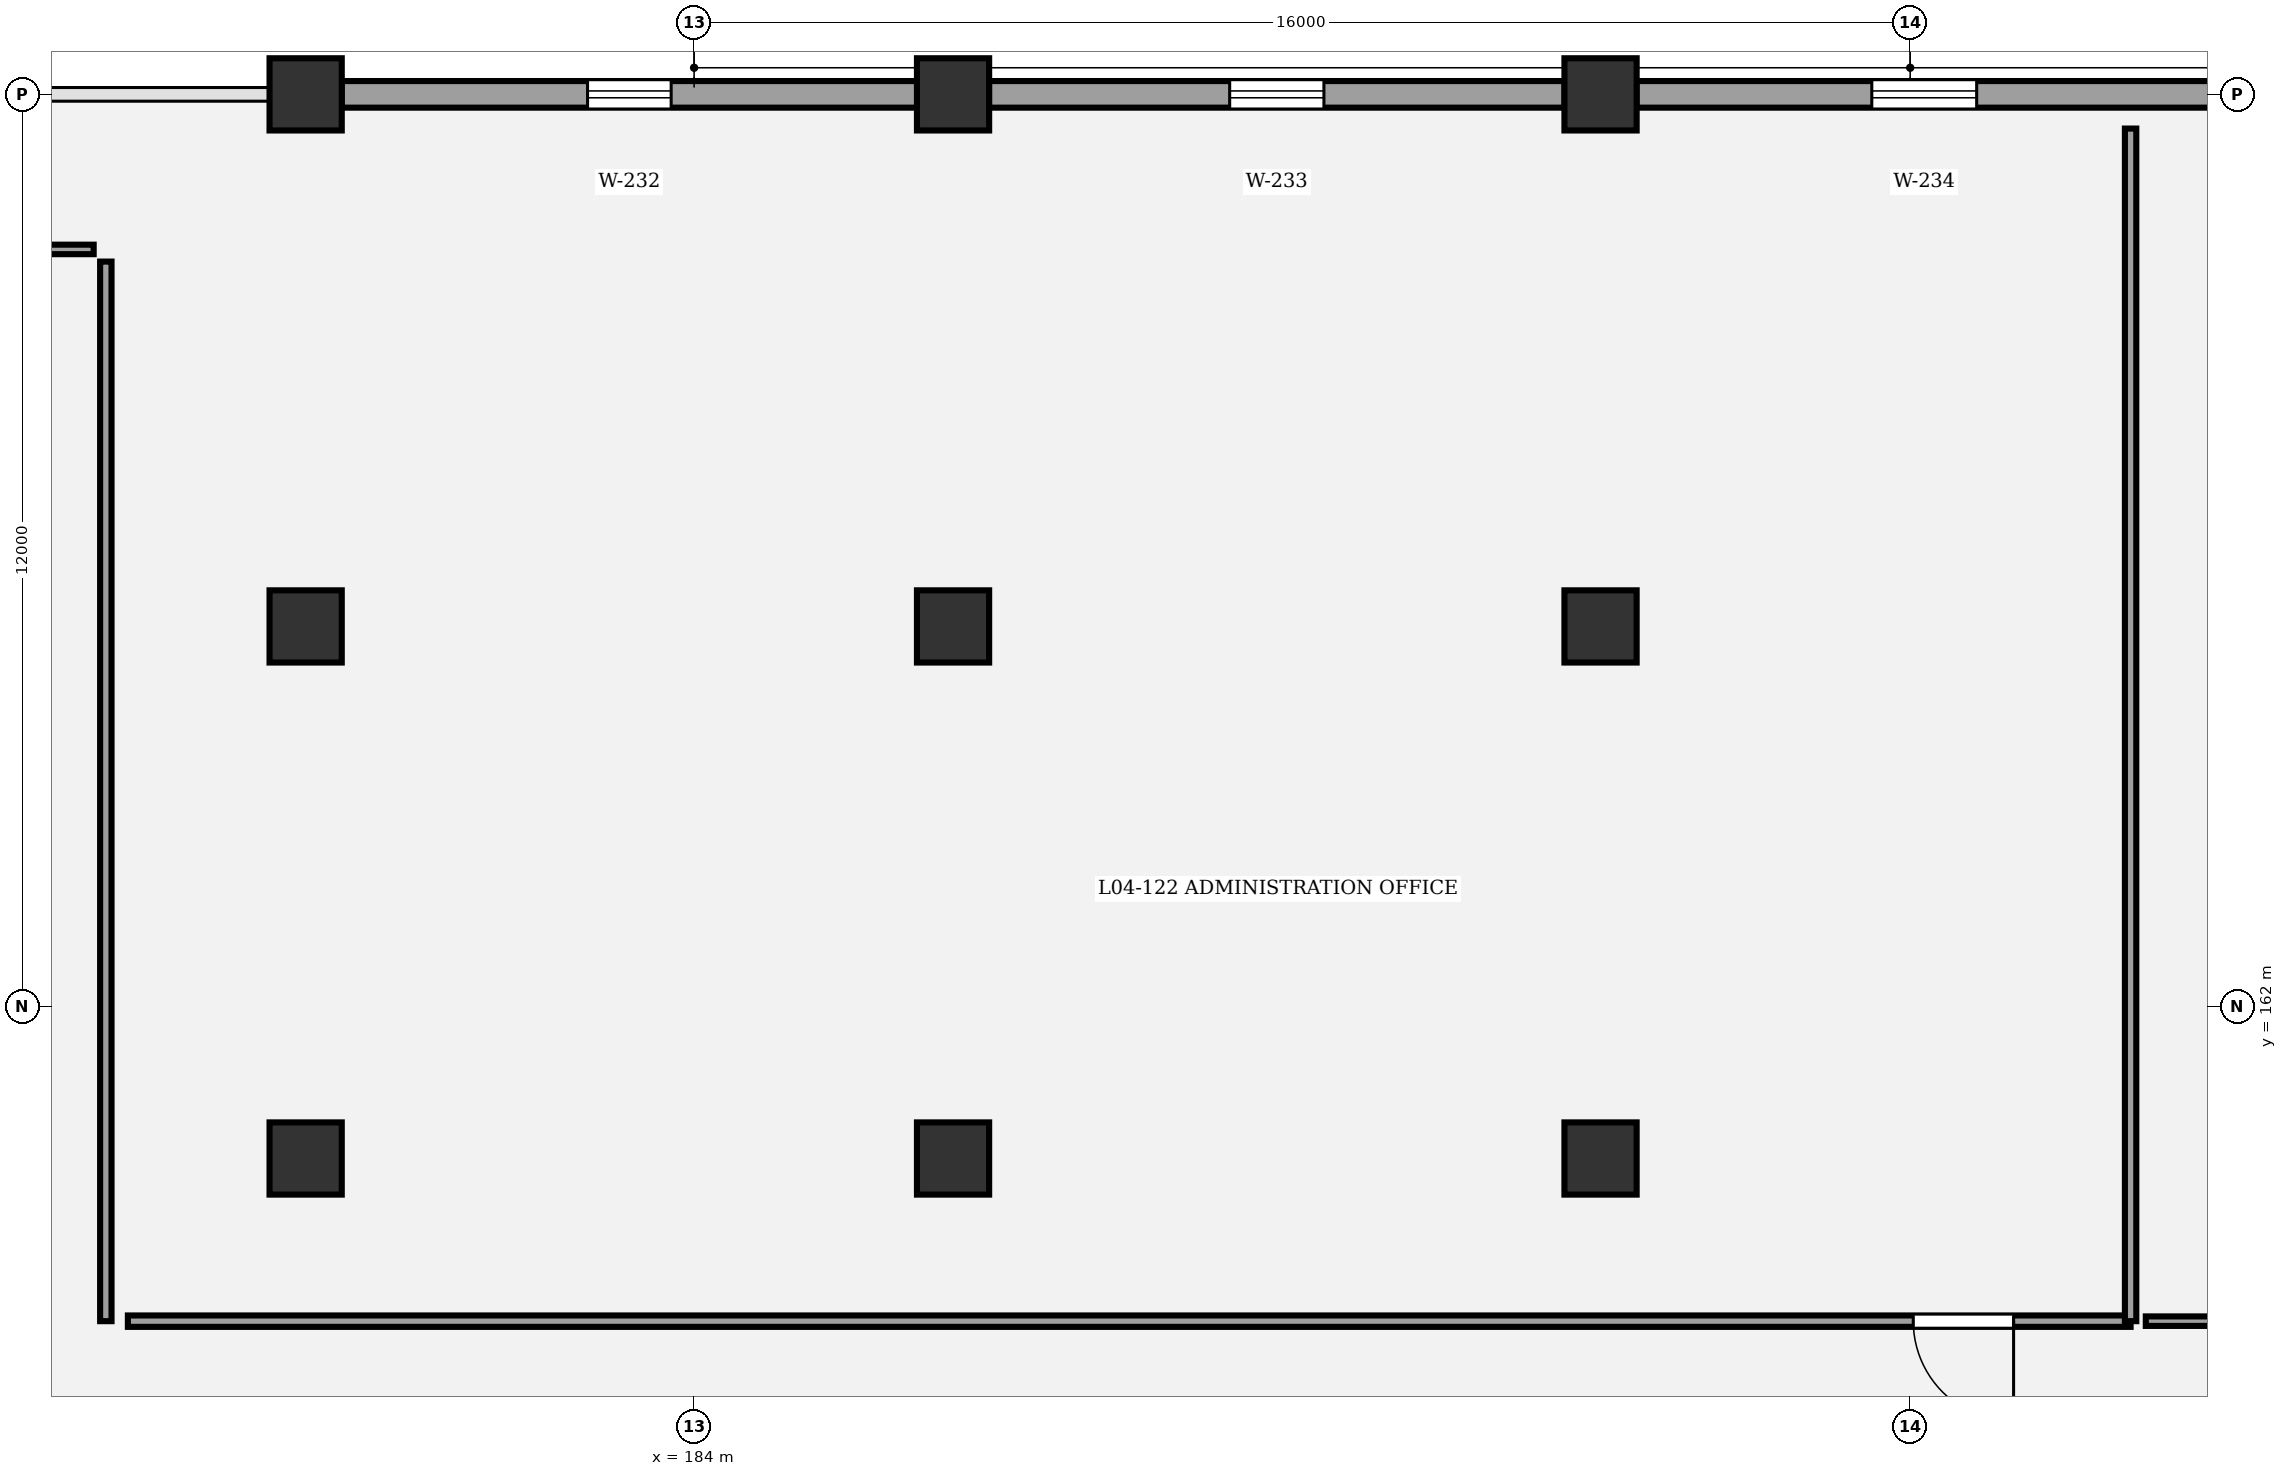
"""IFC4 building model, lengths in metres.
Left out: names, types, materials, properties, quantities, classifications, styles, units other than length and angle.
Written with IfcOpenShell. Run it as: python <this file> out.ifc"""

import sys

from ifc_helpers import new_model, si_unit, direction, frame, frame_2d, origin, origin_2d, place, context, subcontext, project, spatial, rectangle, circle, extrude, element, fill, save


model = new_model("IFC4")
c1 = context("Model", 3, precision=1e-05, world=origin(), true_north=direction((0.0, 1.0)))
c2 = subcontext(c1, "Body", "Model", "MODEL_VIEW")
j1 = project(units=[si_unit("LENGTHUNIT", "METRE"), si_unit("PLANEANGLEUNIT", "RADIAN")], contexts=[c1])
p1 = place(None, origin())
s1 = spatial("IfcSite", under=j1, at=p1, CompositionType="ELEMENT")
p2 = place(p1, origin())
s2 = spatial("IfcBuilding", under=s1, at=p2, CompositionType="ELEMENT")
p3 = place(p2, frame((0.0, 0.0, 19.2)))
s3 = spatial("IfcBuildingStorey", under=s2, at=p3, CompositionType="ELEMENT", Elevation=19.2)
for number, where, z_axis, x_axis in (
    (1, (178.889, 160.0, 0.0), (0.0, 0.0, 1.0), (1.0, 0.0, 0.0)),
    (2, (178.889, 167.0, 0.0), (0.0, 0.0, 1.0), (1.0, 0.0, 0.0)),
    (3, (178.889, 174.0, 0.0), (0.0, 0.0, 1.0), (1.0, 0.0, 0.0)),
    (4, (187.407, 160.0, 0.0), (0.0, 0.0, 1.0), (1.0, 0.0, 0.0)),
    (5, (187.407, 167.0, 0.0), (0.0, 0.0, 1.0), (1.0, 0.0, 0.0)),
    (6, (187.407, 174.0, 0.0), (0.0, 0.0, 1.0), (1.0, 0.0, 0.0)),
    (7, (195.926, 160.0, 0.0), (0.0, 0.0, 1.0), (1.0, 0.0, 0.0)),
    (8, (195.926, 167.0, 0.0), (0.0, 0.0, 1.0), (1.0, 0.0, 0.0)),
    (9, (195.926, 174.0, 0.0), (0.0, 0.0, 1.0), (1.0, 0.0, 0.0)),
):
    element("IfcColumn", number, at=place(p3, frame(where, z_axis=z_axis, x_axis=x_axis)), inside=s3, PredefinedType="COLUMN", context=c2, shape_type="SweptSolid", body=[
        extrude(circle(Radius=0.475, at=origin_2d()), origin(), (0.0, 0.0, 1.0), 4.8),
    ])
p4 = place(p3, frame((179.362, 174.0, 0.0), z_axis=(0.0, 0.0, 1.0), x_axis=(1.0, 0.0, 0.0)))
e10 = element("IfcWall", 10, at=p4, inside=s3, PredefinedType="STANDARD", context=c2, shape_type="SweptSolid", body=[
    extrude(rectangle(XDim=7.572, YDim=0.35, at=frame_2d((3.786, 0.0))), origin(), (0.0, 0.0, 1.0), 3.56),
])
p5 = place(p4, frame((3.236, 0.0, 0.9)))
e11 = element("IfcOpeningElement", 11, at=p5, cuts=e10, PredefinedType="OPENING", context=c2, shape_type="SweptSolid", body=[
    extrude(rectangle(XDim=1.1, YDim=1.75, at=frame_2d((0.55, 0.875))), frame((0.0, 0.185, 0.0), z_axis=(0.0, -1.0, 0.0), x_axis=(1.0, 0.0, 0.0)), (0.0, 0.0, 1.0), 0.37),
])
p6 = place(p3, frame((187.88, 174.0, 0.0), z_axis=(0.0, 0.0, 1.0), x_axis=(1.0, 0.0, 0.0)))
e12 = element("IfcWall", 12, at=p6, inside=s3, PredefinedType="STANDARD", context=c2, shape_type="SweptSolid", body=[
    extrude(rectangle(XDim=7.573, YDim=0.35, at=frame_2d((3.787, 0.0))), origin(), (0.0, 0.0, 1.0), 3.56),
])
p7 = place(p6, frame((3.167, 0.0, 0.9)))
e13 = element("IfcOpeningElement", 13, at=p7, cuts=e12, PredefinedType="OPENING", context=c2, shape_type="SweptSolid", body=[
    extrude(rectangle(XDim=1.24, YDim=1.75, at=frame_2d((0.62, 0.875))), frame((0.0, 0.185, 0.0), z_axis=(0.0, -1.0, 0.0), x_axis=(1.0, 0.0, 0.0)), (0.0, 0.0, 1.0), 0.37),
])
p8 = place(p3, frame((196.399, 174.0, 0.0), z_axis=(0.0, 0.0, 1.0), x_axis=(1.0, 0.0, 0.0)))
e14 = element("IfcWall", 14, at=p8, inside=s3, PredefinedType="STANDARD", context=c2, shape_type="SweptSolid", body=[
    extrude(rectangle(XDim=7.572, YDim=0.35, at=frame_2d((3.786, 0.0))), origin(), (0.0, 0.0, 1.0), 3.56),
])
p9 = place(p8, frame((3.096, 0.0, 0.9)))
e15 = element("IfcOpeningElement", 15, at=p9, cuts=e14, PredefinedType="OPENING", context=c2, shape_type="SweptSolid", body=[
    extrude(rectangle(XDim=1.38, YDim=1.75, at=frame_2d((0.69, 0.875))), frame((0.0, 0.185, 0.0), z_axis=(0.0, -1.0, 0.0), x_axis=(1.0, 0.0, 0.0)), (0.0, 0.0, 1.0), 0.37),
])
p10 = place(p3, frame((176.1, 171.96, 0.0), z_axis=(0.0, 0.0, 1.0), x_axis=(-1.0, 0.0, 0.0)))
e16 = element("IfcWall", 16, at=p10, inside=s3, PredefinedType="PARTITIONING", context=c2, shape_type="SweptSolid", body=[
    extrude(rectangle(XDim=26.1, YDim=0.125, at=frame_2d((13.05, 0.0))), origin(), (0.0, 0.0, 1.0), 3.55),
])
p11 = place(p10, frame((8.804, 0.0, 0.0)))
e17 = element("IfcOpeningElement", 17, at=p11, cuts=e16, PredefinedType="OPENING", context=c2, shape_type="SweptSolid", body=[
    extrude(rectangle(XDim=1.22, YDim=2.2, at=frame_2d((0.61, 1.1))), frame((0.0, 0.073, 0.0), z_axis=(0.0, -1.0, 0.0), x_axis=(1.0, 0.0, 0.0)), (0.0, 0.0, 1.0), 0.145),
])
p12 = place(p3, frame((202.9, 157.86, 0.0), z_axis=(0.0, 0.0, 1.0), x_axis=(-1.0, 0.0, 0.0)))
e18 = element("IfcWall", 18, at=p12, inside=s3, PredefinedType="PARTITIONING", context=c2, shape_type="SweptSolid", body=[
    extrude(rectangle(XDim=26.35, YDim=0.15, at=frame_2d((13.175, 0.0))), origin(), (0.0, 0.0, 1.0), 3.55),
])
p13 = place(p12, frame((1.54, 0.0, 0.0)))
e19 = element("IfcOpeningElement", 19, at=p13, cuts=e18, PredefinedType="OPENING", context=c2, shape_type="SweptSolid", body=[
    extrude(rectangle(XDim=1.32, YDim=2.2, at=frame_2d((0.66, 1.1))), frame((0.0, 0.085, 0.0), z_axis=(0.0, -1.0, 0.0), x_axis=(1.0, 0.0, 0.0)), (0.0, 0.0, 1.0), 0.17),
])
p14 = place(p3, frame((216.5, 157.86, 0.0), z_axis=(0.0, 0.0, 1.0), x_axis=(-1.0, 0.0, 0.0)))
e20 = element("IfcWall", 20, at=p14, inside=s3, PredefinedType="PARTITIONING", context=c2, shape_type="SweptSolid", body=[
    extrude(rectangle(XDim=13.4, YDim=0.125, at=frame_2d((6.7, 0.0))), origin(), (0.0, 0.0, 1.0), 3.55),
])
p15 = place(p14, frame((7.704, 0.0, 0.0)))
e21 = element("IfcOpeningElement", 21, at=p15, cuts=e20, PredefinedType="OPENING", context=c2, shape_type="SweptSolid", body=[
    extrude(rectangle(XDim=1.4, YDim=2.2, at=frame_2d((0.7, 1.1))), frame((0.0, 0.073, 0.0), z_axis=(0.0, -1.0, 0.0), x_axis=(1.0, 0.0, 0.0)), (0.0, 0.0, 1.0), 0.145),
])
p16 = place(p3, frame((176.26, 157.86, 0.0), z_axis=(0.0, 0.0, 1.0), x_axis=(0.0, 1.0, 0.0)))
e22 = element("IfcWall", 22, at=p16, inside=s3, PredefinedType="PARTITIONING", context=c2, shape_type="SweptSolid", body=[
    extrude(rectangle(XDim=13.94, YDim=0.15, at=frame_2d((6.97, 0.0))), origin(), (0.0, 0.0, 1.0), 3.55),
])
p17 = place(p3, frame((202.9, 173.55, 0.0), z_axis=(0.0, 0.0, 1.0), x_axis=(0.0, -1.0, 0.0)))
e23 = element("IfcWall", 23, at=p17, inside=s3, PredefinedType="PARTITIONING", context=c2, shape_type="SweptSolid", body=[
    extrude(rectangle(XDim=15.69, YDim=0.15, at=frame_2d((7.845, 0.0))), origin(), (0.0, 0.0, 1.0), 3.55),
])
p18 = place(p5, origin())
e24 = element("IfcWindow", 24, at=p18, inside=s3, PartitioningType="SINGLE_PANEL", PredefinedType="WINDOW", context=c2, shape_type="SweptSolid", body=[
    extrude(rectangle(XDim=1.1, YDim=1.75, at=frame_2d((0.55, 0.875))), frame((0.0, 0.03, 0.0), z_axis=(0.0, -1.0, 0.0), x_axis=(1.0, 0.0, 0.0)), (0.0, 0.0, 1.0), 0.06),
])
fill(e11, e24)
p19 = place(p7, origin())
e25 = element("IfcWindow", 25, at=p19, inside=s3, PartitioningType="SINGLE_PANEL", PredefinedType="WINDOW", context=c2, shape_type="SweptSolid", body=[
    extrude(rectangle(XDim=1.24, YDim=1.75, at=frame_2d((0.62, 0.875))), frame((0.0, 0.03, 0.0), z_axis=(0.0, -1.0, 0.0), x_axis=(1.0, 0.0, 0.0)), (0.0, 0.0, 1.0), 0.06),
])
fill(e13, e25)
p20 = place(p9, origin())
e26 = element("IfcWindow", 26, at=p20, inside=s3, PartitioningType="SINGLE_PANEL", PredefinedType="WINDOW", context=c2, shape_type="SweptSolid", body=[
    extrude(rectangle(XDim=1.38, YDim=1.75, at=frame_2d((0.69, 0.875))), frame((0.0, 0.03, 0.0), z_axis=(0.0, -1.0, 0.0), x_axis=(1.0, 0.0, 0.0)), (0.0, 0.0, 1.0), 0.06),
])
fill(e15, e26)
p21 = place(p13, origin())
e27 = element("IfcDoor", 27, at=p21, inside=s3, OperationType="SINGLE_SWING_LEFT", PredefinedType="DOOR", context=c2, shape_type="SweptSolid", body=[
    extrude(rectangle(XDim=1.32, YDim=2.2, at=frame_2d((0.66, 1.1))), frame((0.0, 0.025, 0.0), z_axis=(0.0, -1.0, 0.0), x_axis=(1.0, 0.0, 0.0)), (0.0, 0.0, 1.0), 0.05),
])
fill(e19, e27)
save(model, sys.argv[1])
